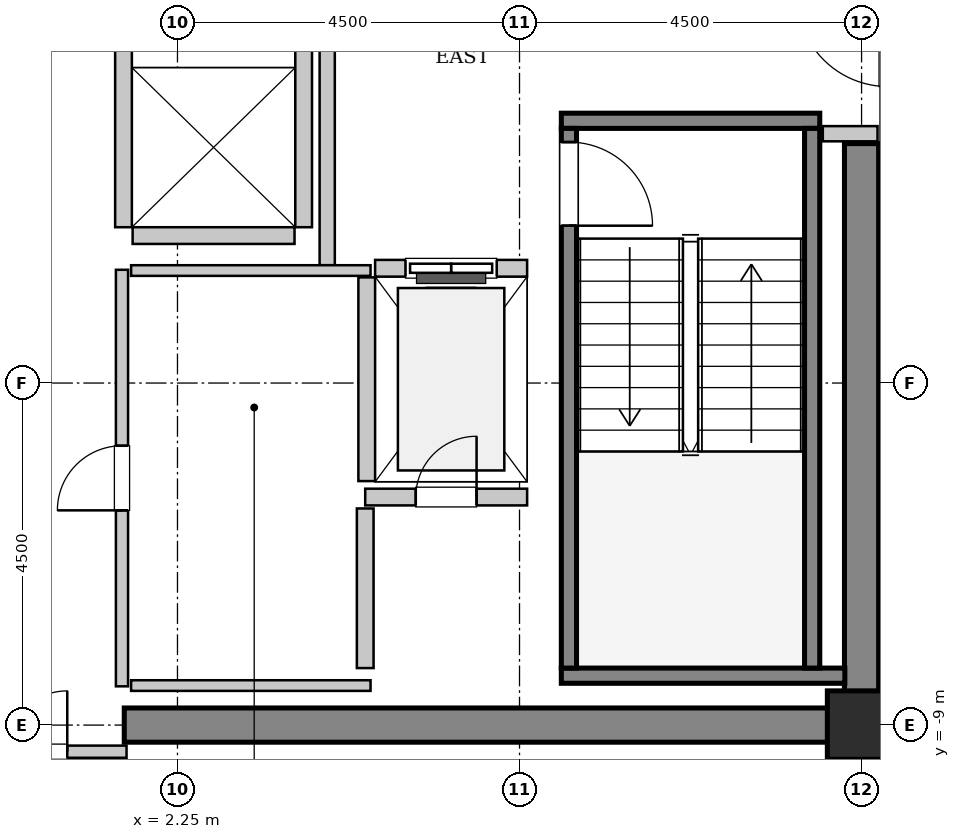
"""IFC4 building model, lengths in metres.
Left out: names, types, materials, properties, quantities, classifications, styles, units other than length and angle.
Written with IfcOpenShell. Run it as: python <this file> out.ifc"""

import sys

from ifc_helpers import new_model, si_unit, direction, frame, frame_2d, origin, origin_2d, place, context, subcontext, project, spatial, rectangle, extrude, source, transform, mapped, element, fill, save


model = new_model("IFC4")
c1 = context("Model", 3, precision=1e-05, world=origin(), true_north=direction((0.0, 1.0)))
c2 = subcontext(c1, "Body", "Model", "MODEL_VIEW")
j1 = project(units=[si_unit("LENGTHUNIT", "METRE"), si_unit("PLANEANGLEUNIT", "RADIAN")], contexts=[c1])
p1 = place(None, origin())
s1 = spatial("IfcSite", under=j1, at=p1, CompositionType="ELEMENT")
p2 = place(p1, origin())
s2 = spatial("IfcBuilding", under=s1, at=p2, CompositionType="ELEMENT")
p3 = place(p2, frame((0.0, 0.0, 306.4)))
s3 = spatial("IfcBuildingStorey", under=s2, at=p3, CompositionType="ELEMENT", Elevation=306.4)
m1 = source(origin(), c2, "Body", "SweptSolid", [
    extrude(rectangle(XDim=9.925, YDim=0.45, at=frame_2d((4.962, 0.0))), origin(), (0.0, 0.0, 1.0), 3.8),
])
p4 = place(p3, frame((1.55, -9.0, 0.0), z_axis=(0.0, 0.0, 1.0), x_axis=(1.0, 0.0, 0.0)))
e1 = element("IfcWall", 1, at=p4, inside=s3, PredefinedType="SHEAR", context=c2, shape_type="MappedRepresentation", body=[
    mapped(m1, transform((0.0, 0.0, 0.0), x_axis=(1.0, 0.0, 0.0), y_axis=(0.0, 1.0, 0.0), z_axis=(0.0, 0.0, 1.0), scale=1.0)),
])
m2 = source(origin(), c2, "Body", "SweptSolid", [
    extrude(rectangle(XDim=7.425, YDim=0.45, at=frame_2d((3.712, 0.0))), origin(), (0.0, 0.0, 1.0), 3.8),
])
p5 = place(p3, frame((11.25, -8.775, 0.0), z_axis=(0.0, 0.0, 1.0), x_axis=(0.0, 1.0, 0.0)))
e2 = element("IfcWall", 2, at=p5, inside=s3, PredefinedType="SHEAR", context=c2, shape_type="MappedRepresentation", body=[
    mapped(m2, transform((0.0, 0.0, 0.0), x_axis=(1.0, 0.0, 0.0), y_axis=(0.0, 1.0, 0.0), z_axis=(0.0, 0.0, 1.0), scale=1.0)),
])
m3 = source(origin(), c2, "Body", "SweptSolid", [
    extrude(rectangle(XDim=0.9, YDim=0.9, at=origin_2d()), origin(), (0.0, 0.0, 1.0), 3.8),
])
p6 = place(p3, frame((11.25, -9.0, 0.0), z_axis=(0.0, 0.0, 1.0), x_axis=(1.0, 0.0, 0.0)))
e3 = element("IfcColumn", 3, at=p6, inside=s3, PredefinedType="COLUMN", context=c2, shape_type="MappedRepresentation", body=[
    mapped(m3, transform((0.0, 0.0, 0.0), x_axis=(1.0, 0.0, 0.0), y_axis=(0.0, 1.0, 0.0), z_axis=(0.0, 0.0, 1.0), scale=1.0)),
])
m4 = source(origin(), c2, "Body", "SweptSolid", [
    extrude(rectangle(XDim=3.4, YDim=0.2, at=frame_2d((1.7, 0.0))), origin(), (0.0, 0.0, 1.0), 3.8),
])
p7 = place(p3, frame((7.3, -1.05, 0.0), z_axis=(0.0, 0.0, 1.0), x_axis=(1.0, 0.0, 0.0)))
e4 = element("IfcWall", 4, at=p7, inside=s3, PredefinedType="SOLIDWALL", context=c2, shape_type="MappedRepresentation", body=[
    mapped(m4, transform((0.0, 0.0, 0.0), x_axis=(1.0, 0.0, 0.0), y_axis=(0.0, 1.0, 0.0), z_axis=(0.0, 0.0, 1.0), scale=1.0)),
])
m5 = source(origin(), c2, "Body", "SweptSolid", [
    extrude(rectangle(XDim=3.73, YDim=0.2, at=frame_2d((1.865, 0.0))), origin(), (0.0, 0.0, 1.0), 3.8),
])
p8 = place(p3, frame((7.3, -8.35, 0.0), z_axis=(0.0, 0.0, 1.0), x_axis=(1.0, 0.0, 0.0)))
e5 = element("IfcWall", 5, at=p8, inside=s3, PredefinedType="SOLIDWALL", context=c2, shape_type="MappedRepresentation", body=[
    mapped(m5, transform((0.0, 0.0, 0.0), x_axis=(1.0, 0.0, 0.0), y_axis=(0.0, 1.0, 0.0), z_axis=(0.0, 0.0, 1.0), scale=1.0)),
])
m6 = source(origin(), c2, "Body", "SweptSolid", [
    extrude(rectangle(XDim=7.1, YDim=0.2, at=frame_2d((3.55, 0.0))), origin(), (0.0, 0.0, 1.0), 3.8),
])
p9 = place(p3, frame((7.4, -1.15, 0.0), z_axis=(0.0, 0.0, 1.0), x_axis=(0.0, -1.0, 0.0)))
e6 = element("IfcWall", 6, at=p9, inside=s3, PredefinedType="SOLIDWALL", context=c2, shape_type="MappedRepresentation", body=[
    mapped(m6, transform((0.0, 0.0, 0.0), x_axis=(1.0, 0.0, 0.0), y_axis=(0.0, 1.0, 0.0), z_axis=(0.0, 0.0, 1.0), scale=1.0)),
])
p10 = place(p9, frame((0.18, 0.0, 0.0)))
e7 = element("IfcOpeningElement", 7, at=p10, cuts=e6, PredefinedType="OPENING", context=c2, shape_type="SweptSolid", body=[
    extrude(rectangle(XDim=1.1, YDim=2.15, at=frame_2d((0.55, 1.075))), frame((0.0, 0.11, 0.0), z_axis=(0.0, -1.0, 0.0), x_axis=(1.0, 0.0, 0.0)), (0.0, 0.0, 1.0), 0.22),
])
p11 = place(p3, frame((10.6, -1.15, 0.0), z_axis=(0.0, 0.0, 1.0), x_axis=(0.0, -1.0, 0.0)))
e8 = element("IfcWall", 8, at=p11, inside=s3, PredefinedType="SOLIDWALL", context=c2, shape_type="MappedRepresentation", body=[
    mapped(m6, transform((0.0, 0.0, 0.0), x_axis=(1.0, 0.0, 0.0), y_axis=(0.0, 1.0, 0.0), z_axis=(0.0, 0.0, 1.0), scale=1.0)),
])
m7 = source(origin(), c2, "Body", "SweptSolid", [
    extrude(rectangle(XDim=2.0, YDim=0.22, at=frame_2d((1.0, 0.0))), origin(), (0.0, 0.0, 1.0), 3.535),
])
p12 = place(p3, frame((6.85, -2.99, 0.0), z_axis=(0.0, 0.0, 1.0), x_axis=(-1.0, 0.0, 0.0)))
e9 = element("IfcWall", 9, at=p12, inside=s3, PredefinedType="SOLIDWALL", context=c2, shape_type="MappedRepresentation", body=[
    mapped(m7, transform((0.0, 0.0, 0.0), x_axis=(1.0, 0.0, 0.0), y_axis=(0.0, 1.0, 0.0), z_axis=(0.0, 0.0, 1.0), scale=1.0)),
])
p13 = place(p12, frame((0.4, 0.0, 0.0)))
e10 = element("IfcOpeningElement", 10, at=p13, cuts=e9, PredefinedType="OPENING", context=c2, shape_type="SweptSolid", body=[
    extrude(rectangle(XDim=1.2, YDim=2.2, at=frame_2d((0.6, 1.1))), frame((0.0, 0.12, 0.0), z_axis=(0.0, -1.0, 0.0), x_axis=(1.0, 0.0, 0.0)), (0.0, 0.0, 1.0), 0.24),
])
m8 = source(origin(), c2, "Body", "SweptSolid", [
    extrude(rectangle(XDim=2.68, YDim=0.22, at=frame_2d((1.34, 0.0))), origin(), (0.0, 0.0, 1.0), 3.535),
])
p14 = place(p3, frame((4.74, -3.11, 0.0), z_axis=(0.0, 0.0, 1.0), x_axis=(0.0, -1.0, 0.0)))
e11 = element("IfcWall", 11, at=p14, inside=s3, PredefinedType="SOLIDWALL", context=c2, shape_type="MappedRepresentation", body=[
    mapped(m8, transform((0.0, 0.0, 0.0), x_axis=(1.0, 0.0, 0.0), y_axis=(0.0, 1.0, 0.0), z_axis=(0.0, 0.0, 1.0), scale=1.0)),
])
m9 = source(origin(), c2, "Body", "SweptSolid", [
    extrude(rectangle(XDim=4.9, YDim=0.22, at=frame_2d((2.45, 0.0))), origin(), (0.0, 0.0, 1.0), 3.535),
])
for number, where, z_axis, x_axis in (
    (12, (1.54, 2.45, 0.0), (0.0, 0.0, 1.0), (0.0, -1.0, 0.0)),
    (13, (3.91, -2.45, 0.0), (0.0, 0.0, 1.0), (0.0, 1.0, 0.0)),
):
    element("IfcWall", number, at=place(p3, frame(where, z_axis=z_axis, x_axis=x_axis)), inside=s3, PredefinedType="SOLIDWALL", context=c2, shape_type="MappedRepresentation", body=[
        mapped(m9, transform((0.0, 0.0, 0.0), x_axis=(1.0, 0.0, 0.0), y_axis=(0.0, 1.0, 0.0), z_axis=(0.0, 0.0, 1.0), scale=1.0)),
    ])
m10 = source(origin(), c2, "Body", "SweptSolid", [
    extrude(rectangle(XDim=2.13, YDim=0.22, at=frame_2d((1.065, 0.0))), origin(), (0.0, 0.0, 1.0), 3.535),
])
p15 = place(p3, frame((1.66, -2.56, 0.0), z_axis=(0.0, 0.0, 1.0), x_axis=(1.0, 0.0, 0.0)))
e14 = element("IfcWall", 14, at=p15, inside=s3, PredefinedType="SOLIDWALL", context=c2, shape_type="MappedRepresentation", body=[
    mapped(m10, transform((0.0, 0.0, 0.0), x_axis=(1.0, 0.0, 0.0), y_axis=(0.0, 1.0, 0.0), z_axis=(0.0, 0.0, 1.0), scale=1.0)),
])
p16 = place(p3, frame((4.72, -6.0, 0.0), z_axis=(0.0, 0.0, 1.0), x_axis=(1.0, 0.0, 0.0)))
e15 = element("IfcWall", 15, at=p16, inside=s3, PredefinedType="SOLIDWALL", context=c2, shape_type="MappedRepresentation", body=[
    mapped(m10, transform((0.0, 0.0, 0.0), x_axis=(1.0, 0.0, 0.0), y_axis=(0.0, 1.0, 0.0), z_axis=(0.0, 0.0, 1.0), scale=1.0)),
])
p17 = place(p16, frame((0.665, 0.0, 0.0)))
e16 = element("IfcOpeningElement", 16, at=p17, cuts=e15, PredefinedType="OPENING", context=c2, shape_type="SweptSolid", body=[
    extrude(rectangle(XDim=0.8, YDim=2.0, at=frame_2d((0.4, 1.0))), frame((0.0, 0.12, 0.0), z_axis=(0.0, -1.0, 0.0), x_axis=(1.0, 0.0, 0.0)), (0.0, 0.0, 1.0), 0.24),
])
m11 = source(origin(), c2, "Body", "SweptSolid", [
    extrude(rectangle(XDim=2.1, YDim=0.22, at=frame_2d((1.05, 0.0))), origin(), (0.0, 0.0, 1.0), 3.535),
])
p18 = place(p3, frame((4.72, -8.25, 0.0), z_axis=(0.0, 0.0, 1.0), x_axis=(0.0, 1.0, 0.0)))
e17 = element("IfcWall", 17, at=p18, inside=s3, PredefinedType="SOLIDWALL", context=c2, shape_type="MappedRepresentation", body=[
    mapped(m11, transform((0.0, 0.0, 0.0), x_axis=(1.0, 0.0, 0.0), y_axis=(0.0, 1.0, 0.0), z_axis=(0.0, 0.0, 1.0), scale=1.0)),
])
m12 = source(origin(), c2, "Body", "SweptSolid", [
    extrude(rectangle(XDim=5.9, YDim=0.2, at=frame_2d((2.95, 0.0))), origin(), (0.0, 0.0, 1.0), 3.535),
])
p19 = place(p3, frame((4.22, -2.95, 0.0), z_axis=(0.0, 0.0, 1.0), x_axis=(0.0, 1.0, 0.0)))
e18 = element("IfcWall", 18, at=p19, inside=s3, PredefinedType="PARTITIONING", context=c2, shape_type="MappedRepresentation", body=[
    mapped(m12, transform((0.0, 0.0, 0.0), x_axis=(1.0, 0.0, 0.0), y_axis=(0.0, 1.0, 0.0), z_axis=(0.0, 0.0, 1.0), scale=1.0)),
])
m13 = source(origin(), c2, "Body", "SweptSolid", [
    extrude(rectangle(XDim=0.72, YDim=0.2, at=frame_2d((0.36, 0.0))), origin(), (0.0, 0.0, 1.0), 3.535),
])
p20 = place(p3, frame((10.74, -1.22, 0.0), z_axis=(0.0, 0.0, 1.0), x_axis=(1.0, 0.0, 0.0)))
e19 = element("IfcWall", 19, at=p20, inside=s3, PredefinedType="PARTITIONING", context=c2, shape_type="MappedRepresentation", body=[
    mapped(m13, transform((0.0, 0.0, 0.0), x_axis=(1.0, 0.0, 0.0), y_axis=(0.0, 1.0, 0.0), z_axis=(0.0, 0.0, 1.0), scale=1.0)),
])
m14 = source(origin(), c2, "Body", "SweptSolid", [
    extrude(rectangle(XDim=3.16, YDim=0.16, at=frame_2d((1.58, 0.0))), origin(), (0.0, 0.0, 1.0), 2.625),
])
p21 = place(p3, frame((-1.58, -9.35, 0.0), z_axis=(0.0, 0.0, 1.0), x_axis=(1.0, 0.0, 0.0)))
e20 = element("IfcWall", 20, at=p21, inside=s3, PredefinedType="PARTITIONING", context=c2, shape_type="MappedRepresentation", body=[
    mapped(m14, transform((0.0, 0.0, 0.0), x_axis=(1.0, 0.0, 0.0), y_axis=(0.0, 1.0, 0.0), z_axis=(0.0, 0.0, 1.0), scale=1.0)),
])
p22 = place(p21, frame((0.78, 0.0, 0.0)))
e21 = element("IfcOpeningElement", 21, at=p22, cuts=e20, PredefinedType="OPENING", context=c2, shape_type="SweptSolid", body=[
    extrude(rectangle(XDim=1.6, YDim=2.3, at=frame_2d((0.8, 1.15))), frame((0.0, 0.09, 0.0), z_axis=(0.0, -1.0, 0.0), x_axis=(1.0, 0.0, 0.0)), (0.0, 0.0, 1.0), 0.18),
])
m15 = source(origin(), c2, "Body", "SweptSolid", [
    extrude(rectangle(XDim=5.48, YDim=0.16, at=frame_2d((2.74, 0.0))), origin(), (0.0, 0.0, 1.0), 3.535),
])
p23 = place(p3, frame((1.52, -8.49, 0.0), z_axis=(0.0, 0.0, 1.0), x_axis=(0.0, 1.0, 0.0)))
e22 = element("IfcWall", 22, at=p23, inside=s3, PredefinedType="PARTITIONING", context=c2, shape_type="MappedRepresentation", body=[
    mapped(m15, transform((0.0, 0.0, 0.0), x_axis=(1.0, 0.0, 0.0), y_axis=(0.0, 1.0, 0.0), z_axis=(0.0, 0.0, 1.0), scale=1.0)),
])
p24 = place(p23, frame((2.315, 0.0, 0.0)))
e23 = element("IfcOpeningElement", 23, at=p24, cuts=e22, PredefinedType="OPENING", context=c2, shape_type="SweptSolid", body=[
    extrude(rectangle(XDim=0.85, YDim=2.1, at=frame_2d((0.425, 1.05))), frame((0.0, 0.09, 0.0), z_axis=(0.0, -1.0, 0.0), x_axis=(1.0, 0.0, 0.0)), (0.0, 0.0, 1.0), 0.18),
])
m16 = source(origin(), c2, "Body", "SweptSolid", [
    extrude(rectangle(XDim=3.15, YDim=0.14, at=frame_2d((1.575, 0.0))), origin(), (0.0, 0.0, 1.0), 3.535),
])
for number, where, z_axis, x_axis in (
    (24, (1.64, -3.02, 0.0), (0.0, 0.0, 1.0), (1.0, 0.0, 0.0)),
    (25, (1.64, -8.48, 0.0), (0.0, 0.0, 1.0), (1.0, 0.0, 0.0)),
):
    element("IfcWall", number, at=place(p3, frame(where, z_axis=z_axis, x_axis=x_axis)), inside=s3, PredefinedType="PARTITIONING", context=c2, shape_type="MappedRepresentation", body=[
        mapped(m16, transform((0.0, 0.0, 0.0), x_axis=(1.0, 0.0, 0.0), y_axis=(0.0, 1.0, 0.0), z_axis=(0.0, 0.0, 1.0), scale=1.0)),
    ])
m17 = source(origin(), c2, "Body", "SweptSolid", [
    extrude(rectangle(XDim=1.1, YDim=2.15, at=frame_2d((0.55, 1.075))), frame((0.0, 0.025, 0.0), z_axis=(0.0, -1.0, 0.0), x_axis=(1.0, 0.0, 0.0)), (0.0, 0.0, 1.0), 0.05),
])
p25 = place(p10, origin())
e26 = element("IfcDoor", 26, at=p25, inside=s3, OperationType="SINGLE_SWING_RIGHT", PredefinedType="DOOR", context=c2, shape_type="MappedRepresentation", body=[
    mapped(m17, transform((0.0, 0.0, 0.0), x_axis=(1.0, 0.0, 0.0), y_axis=(0.0, 1.0, 0.0), z_axis=(0.0, 0.0, 1.0), scale=1.0)),
])
fill(e7, e26)
m18 = source(origin(), c2, "Body", "SweptSolid", [
    extrude(rectangle(XDim=1.2, YDim=2.2, at=frame_2d((0.6, 1.1))), frame((0.0, 0.025, 0.0), z_axis=(0.0, -1.0, 0.0), x_axis=(1.0, 0.0, 0.0)), (0.0, 0.0, 1.0), 0.05),
])
p26 = place(p13, origin())
e27 = element("IfcDoor", 27, at=p26, inside=s3, OperationType="SLIDING_TO_LEFT", PredefinedType="DOOR", context=c2, shape_type="MappedRepresentation", body=[
    mapped(m18, transform((0.0, 0.0, 0.0), x_axis=(1.0, 0.0, 0.0), y_axis=(0.0, 1.0, 0.0), z_axis=(0.0, 0.0, 1.0), scale=1.0)),
])
fill(e10, e27)
m19 = source(origin(), c2, "Body", "SweptSolid", [
    extrude(rectangle(XDim=0.8, YDim=2.0, at=frame_2d((0.4, 1.0))), frame((0.0, 0.025, 0.0), z_axis=(0.0, -1.0, 0.0), x_axis=(1.0, 0.0, 0.0)), (0.0, 0.0, 1.0), 0.05),
])
p27 = place(p17, origin())
e28 = element("IfcDoor", 28, at=p27, inside=s3, OperationType="SINGLE_SWING_RIGHT", PredefinedType="TRAPDOOR", context=c2, shape_type="MappedRepresentation", body=[
    mapped(m19, transform((0.0, 0.0, 0.0), x_axis=(1.0, 0.0, 0.0), y_axis=(0.0, 1.0, 0.0), z_axis=(0.0, 0.0, 1.0), scale=1.0)),
])
fill(e16, e28)
m20 = source(origin(), c2, "Body", "SweptSolid", [
    extrude(rectangle(XDim=1.6, YDim=2.3, at=frame_2d((0.8, 1.15))), frame((0.0, 0.025, 0.0), z_axis=(0.0, -1.0, 0.0), x_axis=(1.0, 0.0, 0.0)), (0.0, 0.0, 1.0), 0.05),
])
p28 = place(p22, origin())
e29 = element("IfcDoor", 29, at=p28, inside=s3, OperationType="DOUBLE_DOOR_SINGLE_SWING", PredefinedType="DOOR", context=c2, shape_type="MappedRepresentation", body=[
    mapped(m20, transform((0.0, 0.0, 0.0), x_axis=(1.0, 0.0, 0.0), y_axis=(0.0, 1.0, 0.0), z_axis=(0.0, 0.0, 1.0), scale=1.0)),
])
fill(e21, e29)
m21 = source(origin(), c2, "Body", "SweptSolid", [
    extrude(rectangle(XDim=0.85, YDim=2.1, at=frame_2d((0.425, 1.05))), frame((0.0, 0.025, 0.0), z_axis=(0.0, -1.0, 0.0), x_axis=(1.0, 0.0, 0.0)), (0.0, 0.0, 1.0), 0.05),
])
p29 = place(p24, origin())
e30 = element("IfcDoor", 30, at=p29, inside=s3, OperationType="SINGLE_SWING_LEFT", PredefinedType="DOOR", context=c2, shape_type="MappedRepresentation", body=[
    mapped(m21, transform((0.0, 0.0, 0.0), x_axis=(1.0, 0.0, 0.0), y_axis=(0.0, 1.0, 0.0), z_axis=(0.0, 0.0, 1.0), scale=1.0)),
])
fill(e23, e30)
save(model, sys.argv[1])
